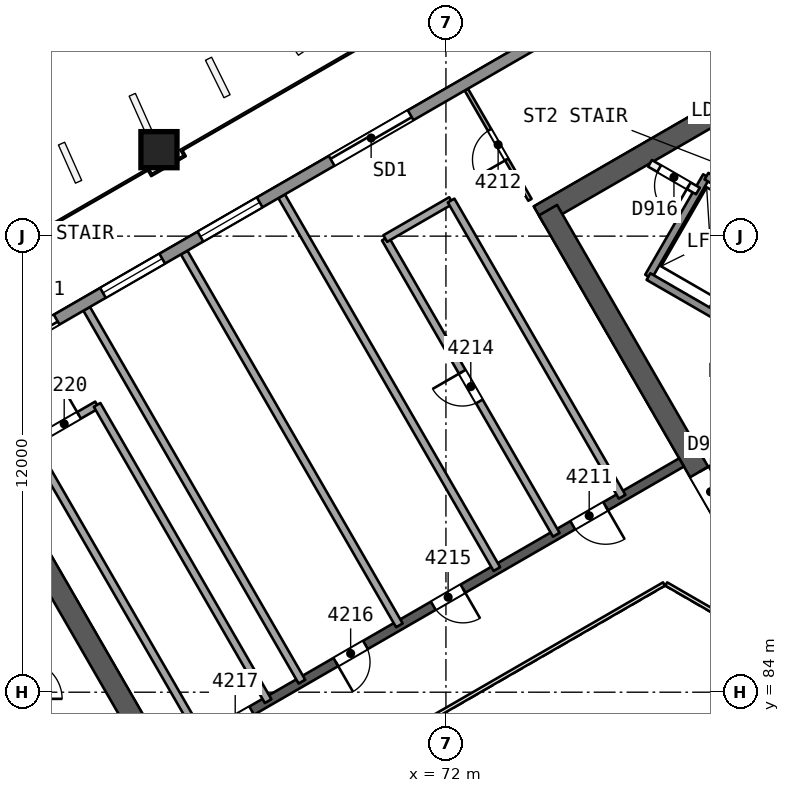
"""IFC4 building model, lengths in metres.
Left out: names, types, materials, properties, quantities, classifications, styles, units other than length and angle.
Written with IfcOpenShell. Run it as: python <this file> out.ifc"""

import sys

from ifc_helpers import new_model, si_unit, direction, frame, frame_2d, origin, origin_2d, place, context, subcontext, project, spatial, rectangle, extrude, element, fill, save


model = new_model("IFC4")
c1 = context("Model", 3, precision=1e-05, world=origin(), true_north=direction((0.0, 1.0)))
c2 = subcontext(c1, "Body", "Model", "MODEL_VIEW")
j1 = project(units=[si_unit("LENGTHUNIT", "METRE"), si_unit("PLANEANGLEUNIT", "RADIAN")], contexts=[c1])
p1 = place(None, origin())
s1 = spatial("IfcSite", under=j1, at=p1, CompositionType="ELEMENT")
p2 = place(p1, origin())
s2 = spatial("IfcBuilding", under=s1, at=p2, CompositionType="ELEMENT")
p3 = place(p2, frame((0.0, 0.0, 174.8)))
s3 = spatial("IfcBuildingStorey", under=s2, at=p3, CompositionType="ELEMENT", Elevation=174.8)
p4 = place(p3, frame((65.682, 80.0, 0.0), z_axis=(0.0, 0.0, 1.0), x_axis=(-0.500000202252, 0.866025287014, 0.0)))
e1 = element("IfcWall", 1, at=p4, inside=s3, PredefinedType="SHEAR", context=c2, shape_type="SweptSolid", body=[
    extrude(rectangle(XDim=10.221, YDim=0.55, at=frame_2d((5.111, 0.0))), origin(), (0.0, 0.0, 1.0), 3.7),
])
p5 = place(p4, frame((0.791, 0.0, 0.0)))
e2 = element("IfcOpeningElement", 2, at=p5, cuts=e1, PredefinedType="OPENING", context=c2, shape_type="SweptSolid", body=[
    extrude(rectangle(XDim=1.2, YDim=2.1, at=frame_2d((0.6, 1.05))), frame((0.0, 0.286, 0.0), z_axis=(0.0, -1.0, 0.0), x_axis=(1.0, 0.0, 0.0)), (0.0, 0.0, 1.0), 0.571),
])
p6 = place(p3, frame((86.723, 103.633, 0.0), z_axis=(0.0, 0.0, 1.0), x_axis=(-0.866023530946, -0.500003243837, 0.0)))
e3 = element("IfcWall", 3, at=p6, inside=s3, PredefinedType="SHEAR", context=c2, shape_type="SweptSolid", body=[
    extrude(rectangle(XDim=14.175, YDim=0.55, at=frame_2d((7.087, 0.0))), origin(), (0.0, 0.0, 1.0), 3.7),
])
p7 = place(p3, frame((74.686, 96.683, 0.0), z_axis=(0.0, 0.0, 1.0), x_axis=(0.499997818338, -0.866026663364, 0.0)))
e4 = element("IfcWall", 4, at=p7, inside=s3, PredefinedType="SHEAR", context=c2, shape_type="SweptSolid", body=[
    extrude(rectangle(XDim=10.105, YDim=0.55, at=frame_2d((5.052, 0.0))), origin(), (0.0, 0.0, 1.0), 3.7),
])
p8 = place(p7, frame((7.955, 0.0, 0.0)))
e5 = element("IfcOpeningElement", 5, at=p8, cuts=e4, PredefinedType="OPENING", context=c2, shape_type="SweptSolid", body=[
    extrude(rectangle(XDim=1.2, YDim=2.1, at=frame_2d((0.6, 1.05))), frame((0.0, 0.286, 0.0), z_axis=(0.0, -1.0, 0.0), x_axis=(1.0, 0.0, 0.0)), (0.0, 0.0, 1.0), 0.571),
])
p9 = place(p3, frame((78.2, 90.046, 0.0), z_axis=(0.0, 0.0, 1.0), x_axis=(-0.866026492143, -0.499998114903, 0.0)))
e6 = element("IfcWall", 6, at=p9, inside=s3, PredefinedType="SHEAR", context=c2, shape_type="SweptSolid", body=[
    extrude(rectangle(XDim=15.588, YDim=0.25, at=frame_2d((7.794, 0.0))), origin(), (0.0, 0.0, 1.0), 3.25),
])
p10 = place(p9, frame((2.306, 0.0, 0.0)))
e7 = element("IfcOpeningElement", 7, at=p10, cuts=e6, PredefinedType="OPENING", context=c2, shape_type="SweptSolid", body=[
    extrude(rectangle(XDim=1.0, YDim=2.1, at=frame_2d((0.5, 1.05))), frame((0.0, 0.135, 0.0), z_axis=(0.0, -1.0, 0.0), x_axis=(1.0, 0.0, 0.0)), (0.0, 0.0, 1.0), 0.271),
])
p11 = place(p9, frame((6.643, 0.0, 0.0)))
e8 = element("IfcOpeningElement", 8, at=p11, cuts=e6, PredefinedType="OPENING", context=c2, shape_type="SweptSolid", body=[
    extrude(rectangle(XDim=0.9, YDim=2.1, at=frame_2d((0.45, 1.05))), frame((0.0, 0.135, 0.0), z_axis=(0.0, -1.0, 0.0), x_axis=(1.0, 0.0, 0.0)), (0.0, 0.0, 1.0), 0.271),
])
p12 = place(p9, frame((9.604, 0.0, 0.0)))
e9 = element("IfcOpeningElement", 9, at=p12, cuts=e6, PredefinedType="OPENING", context=c2, shape_type="SweptSolid", body=[
    extrude(rectangle(XDim=0.9, YDim=2.1, at=frame_2d((0.45, 1.05))), frame((0.0, 0.135, 0.0), z_axis=(0.0, -1.0, 0.0), x_axis=(1.0, 0.0, 0.0)), (0.0, 0.0, 1.0), 0.271),
])
p13 = place(p9, frame((13.062, 0.0, 0.0)))
e10 = element("IfcOpeningElement", 10, at=p13, cuts=e6, PredefinedType="OPENING", context=c2, shape_type="SweptSolid", body=[
    extrude(rectangle(XDim=1.0, YDim=2.1, at=frame_2d((0.5, 1.05))), frame((0.0, 0.135, 0.0), z_axis=(0.0, -1.0, 0.0), x_axis=(1.0, 0.0, 0.0)), (0.0, 0.0, 1.0), 0.271),
])
p14 = place(p3, frame((64.437, 98.296, 0.0), z_axis=(0.010093620709, -0.017482414954, 0.999796221231), x_axis=(-0.499902890187, 0.86584616669, 0.020187025825)))
e11 = element("IfcColumn", 11, at=p14, inside=s3, PredefinedType="COLUMN", context=c2, shape_type="SweptSolid", body=[
    extrude(rectangle(XDim=0.95, YDim=0.95, at=origin_2d()), origin(), (0.0, 0.0, 1.0), 3.701),
])
p15 = place(p3, frame((74.21, 96.956, 0.0), z_axis=(0.0, 0.0, 1.0), x_axis=(-0.499981198768, 0.866036258409, 0.0)))
e12 = element("IfcWall", 12, at=p15, inside=s3, PredefinedType="PARTITIONING", context=c2, shape_type="SweptSolid", body=[
    extrude(rectangle(XDim=3.349, YDim=0.1, at=frame_2d((1.674, 0.0))), origin(), (0.0, 0.0, 1.0), 3.25),
])
p16 = place(p15, frame((1.224, 0.0, 0.0)))
e13 = element("IfcOpeningElement", 13, at=p16, cuts=e12, PredefinedType="OPENING", context=c2, shape_type="SweptSolid", body=[
    extrude(rectangle(XDim=0.9, YDim=2.1, at=frame_2d((0.45, 1.05))), frame((0.0, 0.061, 0.0), z_axis=(0.0, -1.0, 0.0), x_axis=(1.0, 0.0, 0.0)), (0.0, 0.0, 1.0), 0.121),
])
p17 = place(p3, frame((74.904, 88.143, 0.0), z_axis=(0.0, 0.0, 1.0), x_axis=(-0.499990139034, 0.866031096941, 0.0)))
e14 = element("IfcWall", 14, at=p17, inside=s3, PredefinedType="PARTITIONING", context=c2, shape_type="SweptSolid", body=[
    extrude(rectangle(XDim=9.0, YDim=0.2, at=frame_2d((4.5, 0.0))), origin(), (0.0, 0.0, 1.0), 3.25),
])
p18 = place(p17, frame((4.05, 0.0, 0.0)))
e15 = element("IfcOpeningElement", 15, at=p18, cuts=e14, PredefinedType="OPENING", context=c2, shape_type="SweptSolid", body=[
    extrude(rectangle(XDim=0.9, YDim=2.1, at=frame_2d((0.45, 1.05))), frame((0.0, 0.11, 0.0), z_axis=(0.0, -1.0, 0.0), x_axis=(1.0, 0.0, 0.0)), (0.0, 0.0, 1.0), 0.221),
])
p19 = place(p3, frame((70.404, 95.937, 0.0), z_axis=(0.0, 0.0, 1.0), x_axis=(0.866010750942, 0.50002537861, 0.0)))
e16 = element("IfcWall", 16, at=p19, inside=s3, PredefinedType="PARTITIONING", context=c2, shape_type="SweptSolid", body=[
    extrude(rectangle(XDim=2.0, YDim=0.2, at=frame_2d((1.0, 0.0))), origin(), (0.0, 0.0, 1.0), 3.25),
])
p20 = place(p3, frame((72.136, 96.937, 0.0), z_axis=(0.0, 0.0, 1.0), x_axis=(0.499990139034, -0.866031096941, 0.0)))
e17 = element("IfcWall", 17, at=p20, inside=s3, PredefinedType="PARTITIONING", context=c2, shape_type="SweptSolid", body=[
    extrude(rectangle(XDim=9.0, YDim=0.2, at=frame_2d((4.5, 0.0))), origin(), (0.0, 0.0, 1.0), 3.25),
])
for number, where, z_axis, x_axis in (
    (18, (67.676, 97.05, 0.0), (0.0, 0.0, 1.0), (0.5, -0.866, 0.0)),
    (19, (65.111, 95.569, 0.0), (0.0, 0.0, 1.0), (0.5, -0.866, 0.0)),
    (20, (62.546, 94.088, 0.0), (0.0, 0.0, 1.0), (0.5, -0.866, 0.0)),
):
    element("IfcWall", number, at=place(p3, frame(where, z_axis=z_axis, x_axis=x_axis)), inside=s3, PredefinedType="PARTITIONING", context=c2, shape_type="SweptSolid", body=[
        extrude(rectangle(XDim=11.328, YDim=0.2, at=frame_2d((5.664, 0.0))), origin(), (0.0, 0.0, 1.0), 3.25),
    ])
p21 = place(p3, frame((65.589, 82.765, 0.0), z_axis=(0.0, 0.0, 1.0), x_axis=(-0.5000018851, 0.866024315419, 0.0)))
e21 = element("IfcWall", 21, at=p21, inside=s3, PredefinedType="PARTITIONING", context=c2, shape_type="SweptSolid", body=[
    extrude(rectangle(XDim=9.0, YDim=0.2, at=frame_2d((4.5, 0.0))), origin(), (0.0, 0.0, 1.0), 3.25),
])
p22 = place(p3, frame((61.089, 90.559, 0.0), z_axis=(0.0, 0.0, 1.0), x_axis=(0.866041268327, 0.499972520799, 0.0)))
e22 = element("IfcWall", 22, at=p22, inside=s3, PredefinedType="PARTITIONING", context=c2, shape_type="SweptSolid", body=[
    extrude(rectangle(XDim=2.0, YDim=0.2, at=frame_2d((1.0, 0.0))), origin(), (0.0, 0.0, 1.0), 3.25),
])
p23 = place(p22, frame((0.55, 0.0, 0.0)))
e23 = element("IfcOpeningElement", 23, at=p23, cuts=e22, PredefinedType="OPENING", context=c2, shape_type="SweptSolid", body=[
    extrude(rectangle(XDim=0.9, YDim=2.1, at=frame_2d((0.45, 1.05))), frame((0.0, 0.11, 0.0), z_axis=(0.0, -1.0, 0.0), x_axis=(1.0, 0.0, 0.0)), (0.0, 0.0, 1.0), 0.221),
])
p24 = place(p3, frame((62.821, 91.559, 0.0), z_axis=(0.0, 0.0, 1.0), x_axis=(0.5000018851, -0.866024315419, 0.0)))
e24 = element("IfcWall", 24, at=p24, inside=s3, PredefinedType="PARTITIONING", context=c2, shape_type="SweptSolid", body=[
    extrude(rectangle(XDim=9.0, YDim=0.2, at=frame_2d((4.5, 0.0))), origin(), (0.0, 0.0, 1.0), 3.25),
])
p25 = place(p3, frame((42.58, 82.733, 0.0), z_axis=(0.0, 0.0, 1.0), x_axis=(0.866025382531, 0.500000036812, 0.0)))
e25 = element("IfcWall", 25, at=p25, inside=s3, PredefinedType="SOLIDWALL", context=c2, shape_type="SweptSolid", body=[
    extrude(rectangle(XDim=53.42, YDim=0.3, at=frame_2d((26.71, 0.0))), origin(), (0.0, 0.0, 1.0), 3.25),
])
p26 = place(p25, frame((30.499, 0.0, 0.0)))
e26 = element("IfcOpeningElement", 26, at=p26, cuts=e25, PredefinedType="OPENING", context=c2, shape_type="SweptSolid", body=[
    extrude(rectangle(XDim=2.4, YDim=2.4, at=frame_2d((1.2, 1.2))), frame((0.0, 0.161, 0.0), z_axis=(0.0, -1.0, 0.0), x_axis=(1.0, 0.0, 0.0)), (0.0, 0.0, 1.0), 0.321),
])
p27 = place(p25, frame((41.52, 0.0, 0.0)))
e27 = element("IfcOpeningElement", 27, at=p27, cuts=e25, PredefinedType="OPENING", context=c2, shape_type="SweptSolid", body=[
    extrude(rectangle(XDim=2.4, YDim=2.4, at=frame_2d((1.2, 1.2))), frame((0.0, 0.161, 0.0), z_axis=(0.0, -1.0, 0.0), x_axis=(1.0, 0.0, 0.0)), (0.0, 0.0, 1.0), 0.321),
])
p28 = place(p25, frame((19.742, 0.0, 0.0)))
e28 = element("IfcOpeningElement", 28, at=p28, cuts=e25, PredefinedType="OPENING", context=c2, shape_type="SweptSolid", body=[
    extrude(rectangle(XDim=2.4, YDim=2.4, at=frame_2d((1.2, 1.2))), frame((0.0, 0.161, 0.0), z_axis=(0.0, -1.0, 0.0), x_axis=(1.0, 0.0, 0.0)), (0.0, 0.0, 1.0), 0.321),
])
p29 = place(p25, frame((9.507, 0.0, 0.0)))
e29 = element("IfcOpeningElement", 29, at=p29, cuts=e25, PredefinedType="OPENING", context=c2, shape_type="SweptSolid", body=[
    extrude(rectangle(XDim=2.4, YDim=2.4, at=frame_2d((1.2, 1.2))), frame((0.0, 0.161, 0.0), z_axis=(0.0, -1.0, 0.0), x_axis=(1.0, 0.0, 0.0)), (0.0, 0.0, 1.0), 0.321),
])
p30 = place(p25, frame((26.512, 0.0, 0.9)))
e30 = element("IfcOpeningElement", 30, at=p30, cuts=e25, PredefinedType="OPENING", context=c2, shape_type="SweptSolid", body=[
    extrude(rectangle(XDim=1.8, YDim=1.5, at=frame_2d((0.9, 0.75))), frame((0.0, 0.161, 0.0), z_axis=(0.0, -1.0, 0.0), x_axis=(1.0, 0.0, 0.0)), (0.0, 0.0, 1.0), 0.321),
])
p31 = place(p25, frame((23.55, 0.0, 0.9)))
e31 = element("IfcOpeningElement", 31, at=p31, cuts=e25, PredefinedType="OPENING", context=c2, shape_type="SweptSolid", body=[
    extrude(rectangle(XDim=1.8, YDim=1.5, at=frame_2d((0.9, 0.75))), frame((0.0, 0.161, 0.0), z_axis=(0.0, -1.0, 0.0), x_axis=(1.0, 0.0, 0.0)), (0.0, 0.0, 1.0), 0.321),
])
for number, where, z_axis, x_axis in (
    (32, (78.976, 93.986, 0.0), (0.0, 0.0, 1.0), (0.5, 0.866, 0.0)),
    (33, (77.33, 94.936, 0.0), (0.0, 0.0, 1.0), (0.5, 0.866, 0.0)),
):
    element("IfcWall", number, at=place(p3, frame(where, z_axis=z_axis, x_axis=x_axis)), inside=s3, PredefinedType="SOLIDWALL", context=c2, shape_type="SweptSolid", body=[
        extrude(rectangle(XDim=3.05, YDim=0.2, at=frame_2d((1.525, 0.0))), origin(), (0.0, 0.0, 1.0), 3.25),
    ])
p32 = place(p3, frame((86.77, 89.486, 0.0), z_axis=(0.0, 0.0, 1.0), x_axis=(-0.86601811187, 0.500012629753, 0.0)))
e34 = element("IfcWall", 34, at=p32, inside=s3, PredefinedType="SOLIDWALL", context=c2, shape_type="SweptSolid", body=[
    extrude(rectangle(XDim=10.9, YDim=0.2, at=frame_2d((5.45, 0.0))), origin(), (0.0, 0.0, 1.0), 3.25),
])
p33 = place(p32, frame((0.575, 0.0, 0.0)))
e35 = element("IfcOpeningElement", 35, at=p33, cuts=e34, PredefinedType="OPENING", context=c2, shape_type="SweptSolid", body=[
    extrude(rectangle(XDim=1.1, YDim=2.1, at=frame_2d((0.55, 1.05))), frame((0.0, 0.11, 0.0), z_axis=(0.0, -1.0, 0.0), x_axis=(1.0, 0.0, 0.0)), (0.0, 0.0, 1.0), 0.221),
])
p34 = place(p32, frame((2.825, 0.0, 0.0)))
e36 = element("IfcOpeningElement", 36, at=p34, cuts=e34, PredefinedType="OPENING", context=c2, shape_type="SweptSolid", body=[
    extrude(rectangle(XDim=1.1, YDim=2.1, at=frame_2d((0.55, 1.05))), frame((0.0, 0.11, 0.0), z_axis=(0.0, -1.0, 0.0), x_axis=(1.0, 0.0, 0.0)), (0.0, 0.0, 1.0), 0.221),
])
p35 = place(p32, frame((5.075, 0.0, 0.0)))
e37 = element("IfcOpeningElement", 37, at=p35, cuts=e34, PredefinedType="OPENING", context=c2, shape_type="SweptSolid", body=[
    extrude(rectangle(XDim=1.1, YDim=2.1, at=frame_2d((0.55, 1.05))), frame((0.0, 0.11, 0.0), z_axis=(0.0, -1.0, 0.0), x_axis=(1.0, 0.0, 0.0)), (0.0, 0.0, 1.0), 0.221),
])
p36 = place(p32, frame((7.325, 0.0, 0.0)))
e38 = element("IfcOpeningElement", 38, at=p36, cuts=e34, PredefinedType="OPENING", context=c2, shape_type="SweptSolid", body=[
    extrude(rectangle(XDim=1.1, YDim=2.1, at=frame_2d((0.55, 1.05))), frame((0.0, 0.11, 0.0), z_axis=(0.0, -1.0, 0.0), x_axis=(1.0, 0.0, 0.0)), (0.0, 0.0, 1.0), 0.221),
])
p37 = place(p3, frame((78.63, 97.188, 0.0), z_axis=(0.0, 0.0, 1.0), x_axis=(-0.866003949776, 0.500037157592, 0.0)))
e39 = element("IfcWall", 39, at=p37, inside=s3, PredefinedType="PARTITIONING", context=c2, shape_type="SweptSolid", body=[
    extrude(rectangle(XDim=1.455, YDim=0.2, at=frame_2d((0.728, 0.0))), origin(), (0.0, 0.0, 1.0), 3.25),
])
p38 = place(p37, frame((0.278, 0.0, 0.0)))
e40 = element("IfcOpeningElement", 40, at=p38, cuts=e39, PredefinedType="OPENING", context=c2, shape_type="SweptSolid", body=[
    extrude(rectangle(XDim=0.9, YDim=2.1, at=frame_2d((0.45, 1.05))), frame((0.0, 0.11, 0.0), z_axis=(0.0, -1.0, 0.0), x_axis=(1.0, 0.0, 0.0)), (0.0, 0.0, 1.0), 0.221),
])
p39 = place(p3, frame((80.5, 96.627, 0.0), z_axis=(0.0, 0.0, 1.0), x_axis=(-0.86601224135, 0.500022797313, 0.0)))
e41 = element("IfcWall", 41, at=p39, inside=s3, PredefinedType="SOLIDWALL", context=c2, shape_type="SweptSolid", body=[
    extrude(rectangle(XDim=1.9, YDim=0.2, at=frame_2d((0.95, 0.0))), origin(), (0.0, 0.0, 1.0), 3.25),
])
p40 = place(p39, frame((0.4, 0.0, 0.0)))
e42 = element("IfcOpeningElement", 42, at=p40, cuts=e41, PredefinedType="OPENING", context=c2, shape_type="SweptSolid", body=[
    extrude(rectangle(XDim=1.1, YDim=2.1, at=frame_2d((0.55, 1.05))), frame((0.0, 0.11, 0.0), z_axis=(0.0, -1.0, 0.0), x_axis=(1.0, 0.0, 0.0)), (0.0, 0.0, 1.0), 0.221),
])
p41 = place(p3, frame((79.53, 85.846, 0.0), z_axis=(0.0, 0.0, 1.0), x_axis=(-0.866041268327, 0.499972520799, 0.0)))
e43 = element("IfcWall", 43, at=p41, inside=s3, PredefinedType="PARTITIONING", context=c2, shape_type="SweptSolid", body=[
    extrude(rectangle(XDim=2.0, YDim=0.1, at=frame_2d((1.0, 0.0))), origin(), (0.0, 0.0, 1.0), 3.25),
])
p42 = place(p3, frame((77.738, 86.846, 0.0), z_axis=(0.0, 0.0, 1.0), x_axis=(-0.866026658274, -0.499997827154, 0.0)))
e44 = element("IfcWall", 44, at=p42, inside=s3, PredefinedType="PARTITIONING", context=c2, shape_type="SweptSolid", body=[
    extrude(rectangle(XDim=11.588, YDim=0.1, at=frame_2d((5.794, 0.0))), origin(), (0.0, 0.0, 1.0), 3.25),
])
p43 = place(p10, origin())
e45 = element("IfcDoor", 45, at=p43, inside=s3, OperationType="SINGLE_SWING_LEFT", PredefinedType="NOTDEFINED", context=c2, shape_type="SweptSolid", body=[
    extrude(rectangle(XDim=1.0, YDim=2.1, at=frame_2d((0.5, 1.05))), frame((0.0, 0.025, 0.0), z_axis=(0.0, -1.0, 0.0), x_axis=(1.0, 0.0, 0.0)), (0.0, 0.0, 1.0), 0.05),
])
fill(e7, e45)
p44 = place(p16, origin())
e46 = element("IfcDoor", 46, at=p44, inside=s3, OperationType="SINGLE_SWING_LEFT", PredefinedType="NOTDEFINED", context=c2, shape_type="SweptSolid", body=[
    extrude(rectangle(XDim=0.9, YDim=2.1, at=frame_2d((0.45, 1.05))), frame((0.0, 0.025, 0.0), z_axis=(0.0, -1.0, 0.0), x_axis=(1.0, 0.0, 0.0)), (0.0, 0.0, 1.0), 0.05),
])
fill(e13, e46)
p45 = place(p18, origin())
e47 = element("IfcDoor", 47, at=p45, inside=s3, OperationType="SINGLE_SWING_RIGHT", PredefinedType="NOTDEFINED", context=c2, shape_type="SweptSolid", body=[
    extrude(rectangle(XDim=0.9, YDim=2.1, at=frame_2d((0.45, 1.05))), frame((0.0, 0.025, 0.0), z_axis=(0.0, -1.0, 0.0), x_axis=(1.0, 0.0, 0.0)), (0.0, 0.0, 1.0), 0.05),
])
fill(e15, e47)
p46 = place(p11, origin())
e48 = element("IfcDoor", 48, at=p46, inside=s3, OperationType="SINGLE_SWING_LEFT", PredefinedType="NOTDEFINED", context=c2, shape_type="SweptSolid", body=[
    extrude(rectangle(XDim=0.9, YDim=2.1, at=frame_2d((0.45, 1.05))), frame((0.0, 0.025, 0.0), z_axis=(0.0, -1.0, 0.0), x_axis=(1.0, 0.0, 0.0)), (0.0, 0.0, 1.0), 0.05),
])
fill(e8, e48)
p47 = place(p12, origin())
e49 = element("IfcDoor", 49, at=p47, inside=s3, OperationType="SINGLE_SWING_RIGHT", PredefinedType="NOTDEFINED", context=c2, shape_type="SweptSolid", body=[
    extrude(rectangle(XDim=0.9, YDim=2.1, at=frame_2d((0.45, 1.05))), frame((0.0, 0.025, 0.0), z_axis=(0.0, -1.0, 0.0), x_axis=(1.0, 0.0, 0.0)), (0.0, 0.0, 1.0), 0.05),
])
fill(e9, e49)
p48 = place(p13, origin())
e50 = element("IfcDoor", 50, at=p48, inside=s3, OperationType="SINGLE_SWING_RIGHT", PredefinedType="NOTDEFINED", context=c2, shape_type="SweptSolid", body=[
    extrude(rectangle(XDim=1.0, YDim=2.1, at=frame_2d((0.5, 1.05))), frame((0.0, 0.025, 0.0), z_axis=(0.0, -1.0, 0.0), x_axis=(1.0, 0.0, 0.0)), (0.0, 0.0, 1.0), 0.05),
])
fill(e10, e50)
p49 = place(p23, origin())
e51 = element("IfcDoor", 51, at=p49, inside=s3, OperationType="SINGLE_SWING_RIGHT", PredefinedType="NOTDEFINED", context=c2, shape_type="SweptSolid", body=[
    extrude(rectangle(XDim=0.9, YDim=2.1, at=frame_2d((0.45, 1.05))), frame((0.0, 0.025, 0.0), z_axis=(0.0, -1.0, 0.0), x_axis=(1.0, 0.0, 0.0)), (0.0, 0.0, 1.0), 0.05),
])
fill(e23, e51)
p50 = place(p26, origin())
e52 = element("IfcDoor", 52, at=p50, inside=s3, OperationType="SLIDING_TO_LEFT", PredefinedType="NOTDEFINED", context=c2, shape_type="SweptSolid", body=[
    extrude(rectangle(XDim=2.4, YDim=2.4, at=frame_2d((1.2, 1.2))), frame((0.0, 0.025, 0.0), z_axis=(0.0, -1.0, 0.0), x_axis=(1.0, 0.0, 0.0)), (0.0, 0.0, 1.0), 0.05),
])
fill(e26, e52)
p51 = place(p28, origin())
e53 = element("IfcDoor", 53, at=p51, inside=s3, OperationType="SLIDING_TO_LEFT", PredefinedType="NOTDEFINED", context=c2, shape_type="SweptSolid", body=[
    extrude(rectangle(XDim=2.4, YDim=2.4, at=frame_2d((1.2, 1.2))), frame((0.0, 0.025, 0.0), z_axis=(0.0, -1.0, 0.0), x_axis=(1.0, 0.0, 0.0)), (0.0, 0.0, 1.0), 0.05),
])
fill(e28, e53)
p52 = place(p30, origin())
e54 = element("IfcWindow", 54, at=p52, inside=s3, PartitioningType="SINGLE_PANEL", PredefinedType="WINDOW", context=c2, shape_type="SweptSolid", body=[
    extrude(rectangle(XDim=1.8, YDim=1.5, at=frame_2d((0.9, 0.75))), frame((0.0, 0.03, 0.0), z_axis=(0.0, -1.0, 0.0), x_axis=(1.0, 0.0, 0.0)), (0.0, 0.0, 1.0), 0.06),
])
fill(e30, e54)
p53 = place(p31, origin())
e55 = element("IfcWindow", 55, at=p53, inside=s3, PartitioningType="SINGLE_PANEL", PredefinedType="WINDOW", context=c2, shape_type="SweptSolid", body=[
    extrude(rectangle(XDim=1.8, YDim=1.5, at=frame_2d((0.9, 0.75))), frame((0.0, 0.03, 0.0), z_axis=(0.0, -1.0, 0.0), x_axis=(1.0, 0.0, 0.0)), (0.0, 0.0, 1.0), 0.06),
])
fill(e31, e55)
p54 = place(p8, origin())
e56 = element("IfcDoor", 56, at=p54, inside=s3, OperationType="SINGLE_SWING_LEFT", PredefinedType="NOTDEFINED", context=c2, shape_type="SweptSolid", body=[
    extrude(rectangle(XDim=1.2, YDim=2.1, at=frame_2d((0.6, 1.05))), frame((0.0, 0.025, 0.0), z_axis=(0.0, -1.0, 0.0), x_axis=(1.0, 0.0, 0.0)), (0.0, 0.0, 1.0), 0.05),
])
fill(e5, e56)
p55 = place(p38, origin())
e57 = element("IfcDoor", 57, at=p55, inside=s3, OperationType="SINGLE_SWING_LEFT", PredefinedType="NOTDEFINED", context=c2, shape_type="SweptSolid", body=[
    extrude(rectangle(XDim=0.9, YDim=2.1, at=frame_2d((0.45, 1.05))), frame((0.0, 0.025, 0.0), z_axis=(0.0, -1.0, 0.0), x_axis=(1.0, 0.0, 0.0)), (0.0, 0.0, 1.0), 0.05),
])
fill(e40, e57)
save(model, sys.argv[1])
